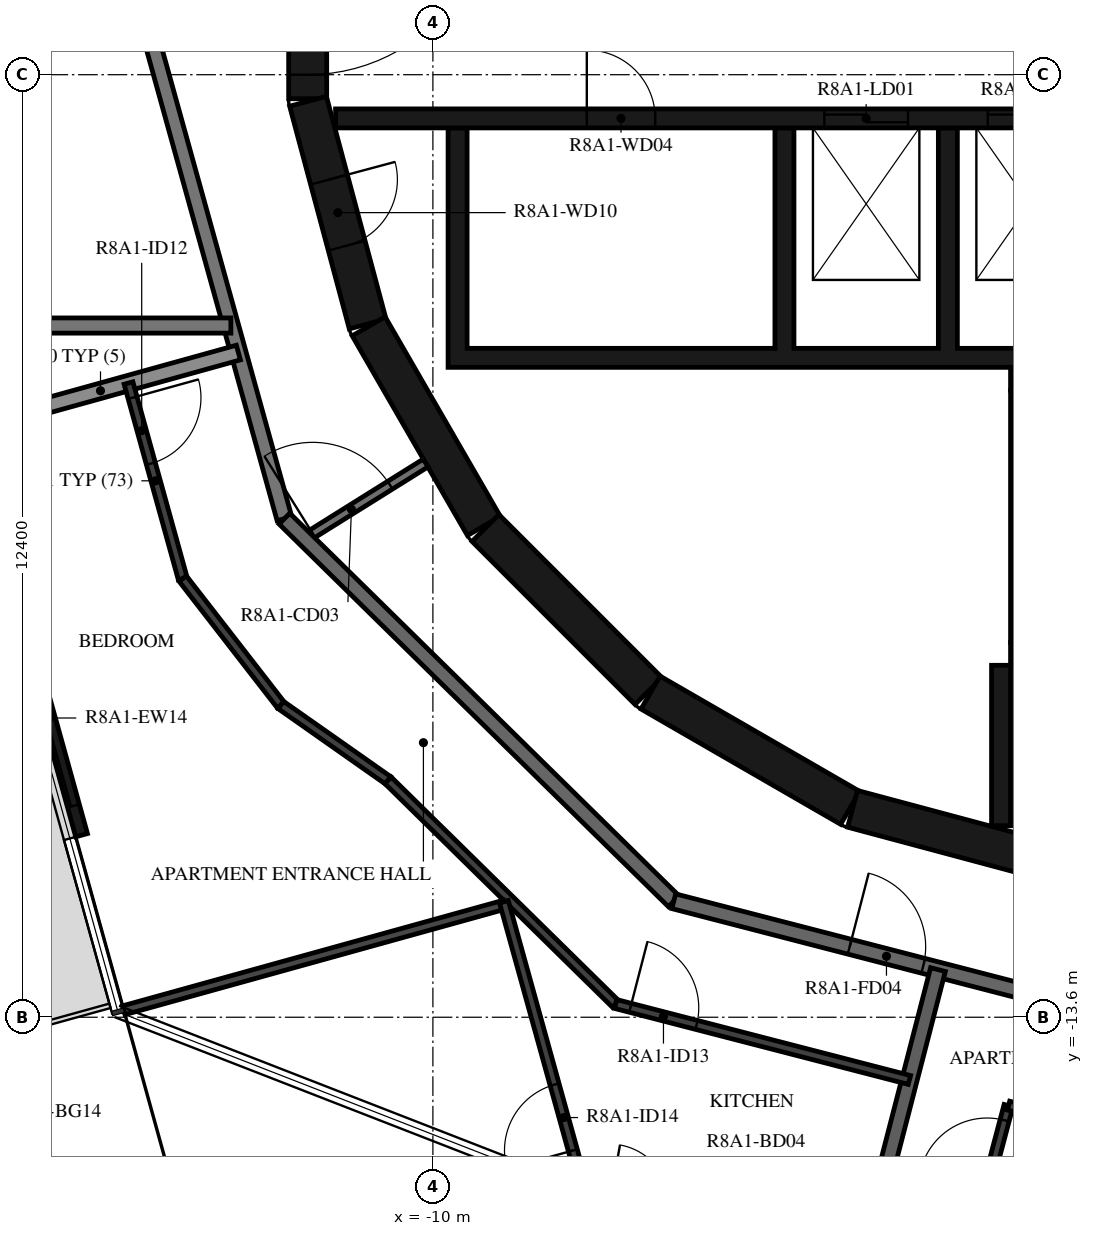
"""IFC4 building model, lengths in metres.
Left out: names, types, materials, properties, quantities, classifications, styles, units other than length and angle.
Written with IfcOpenShell. Run it as: python <this file> out.ifc"""

import sys

from ifc_helpers import new_model, si_unit, direction, frame, frame_2d, origin, place, context, subcontext, project, spatial, polyline, rectangle, outline, extrude, element, fill, save


model = new_model("IFC4")
c1 = context("Model", 3, precision=1e-05, world=origin(), true_north=direction((0.0, 1.0)))
c2 = subcontext(c1, "Body", "Model", "MODEL_VIEW")
j1 = project(units=[si_unit("LENGTHUNIT", "METRE"), si_unit("PLANEANGLEUNIT", "RADIAN")], contexts=[c1])
p1 = place(None, origin())
s1 = spatial("IfcSite", under=j1, at=p1, CompositionType="ELEMENT")
p2 = place(p1, origin())
s2 = spatial("IfcBuilding", under=s1, at=p2, CompositionType="ELEMENT")
p3 = place(p2, frame((0.0, 0.0, 301.7)))
s3 = spatial("IfcBuildingStorey", under=s2, at=p3, CompositionType="ELEMENT", Elevation=301.7)
p4 = place(p3, frame((-15.477, -8.122, 0.0), z_axis=(0.0, 0.0, 1.0), x_axis=(0.267195229387, -0.963642417805, 0.0)))
e1 = element("IfcWall", 1, at=p4, inside=s3, PredefinedType="STANDARD", context=c2, shape_type="SweptSolid", body=[
    extrude(rectangle(XDim=3.2, YDim=0.16, at=frame_2d((1.6, 0.0))), origin(), (0.0, 0.0, 1.0), 3.12),
])
p5 = place(p4, frame((0.4, 0.0, 0.0)))
e2 = element("IfcOpeningElement", 2, at=p5, cuts=e1, PredefinedType="OPENING", context=c2, shape_type="SweptSolid", body=[
    extrude(rectangle(XDim=2.4, YDim=2.4, at=frame_2d((1.2, 1.2))), frame((0.0, 0.09, 0.0), z_axis=(0.0, -1.0, 0.0), x_axis=(1.0, 0.0, 0.0)), (0.0, 0.0, 1.0), 0.18),
])
p6 = place(p3, frame((-11.647, 1.516, 0.0), z_axis=(0.0, 0.0, 1.0), x_axis=(0.0, -1.0, 0.0)))
e3 = element("IfcWall", 3, at=p6, inside=s3, PredefinedType="SHEAR", context=c2, shape_type="SweptSolid", body=[
    extrude(rectangle(XDim=3.033, YDim=0.5, at=frame_2d((1.516, 0.0))), origin(), (0.0, 0.0, 1.0), 3.12),
])
p7 = place(p6, frame((0.316, 0.0, 0.0)))
e4 = element("IfcOpeningElement", 4, at=p7, cuts=e3, PredefinedType="OPENING", context=c2, shape_type="SweptSolid", body=[
    extrude(rectangle(XDim=2.4, YDim=2.1, at=frame_2d((1.2, 1.05))), frame((0.0, 0.26, 0.0), z_axis=(0.0, -1.0, 0.0), x_axis=(1.0, 0.0, 0.0)), (0.0, 0.0, 1.0), 0.52),
])
p8 = place(p3, frame((-11.643, -1.55, 0.0), z_axis=(0.0, 0.0, 1.0), x_axis=(0.258734743916, -0.965948410781, 0.0)))
e5 = element("IfcWall", 5, at=p8, inside=s3, PredefinedType="SHEAR", context=c2, shape_type="SweptSolid", body=[
    extrude(rectangle(XDim=3.033, YDim=0.5, at=frame_2d((1.516, 0.0))), origin(), (0.0, 0.0, 1.0), 3.12),
])
p9 = place(p8, frame((1.066, 0.0, 0.0)))
e6 = element("IfcOpeningElement", 6, at=p9, cuts=e5, PredefinedType="OPENING", context=c2, shape_type="SweptSolid", body=[
    extrude(rectangle(XDim=0.9, YDim=2.1, at=frame_2d((0.45, 1.05))), frame((0.0, 0.26, 0.0), z_axis=(0.0, -1.0, 0.0), x_axis=(1.0, 0.0, 0.0)), (0.0, 0.0, 1.0), 0.52),
])
p10 = place(p3, frame((-10.845, -4.51, 0.0), z_axis=(0.0, 0.0, 1.0), x_axis=(0.500087131594, -0.865975092491, 0.0)))
e7 = element("IfcWall", 7, at=p10, inside=s3, PredefinedType="SHEAR", context=c2, shape_type="SweptSolid", body=[
    extrude(rectangle(XDim=3.033, YDim=0.5, at=frame_2d((1.516, 0.0))), origin(), (0.0, 0.0, 1.0), 3.12),
])
p11 = place(p3, frame((-9.308, -7.164, 0.0), z_axis=(0.0, 0.0, 1.0), x_axis=(0.707106781187, -0.707106781187, 0.0)))
e8 = element("IfcWall", 8, at=p11, inside=s3, PredefinedType="SHEAR", context=c2, shape_type="SweptSolid", body=[
    extrude(rectangle(XDim=3.032, YDim=0.5, at=frame_2d((1.516, 0.0))), origin(), (0.0, 0.0, 1.0), 3.12),
])
for number, where, z_axis, x_axis in (
    (9, (-7.137, -9.329, 0.0), (0.0, 0.0, 1.0), (0.866, -0.5, 0.0)),
    (10, (-4.479, -10.858, 0.0), (0.0, 0.0, 1.0), (0.966, -0.259, 0.0)),
):
    element("IfcWall", number, at=place(p3, frame(where, z_axis=z_axis, x_axis=x_axis)), inside=s3, PredefinedType="SHEAR", context=c2, shape_type="SweptSolid", body=[
        extrude(rectangle(XDim=3.033, YDim=0.5, at=frame_2d((1.516, 0.0))), origin(), (0.0, 0.0, 1.0), 3.12),
    ])
p12 = place(p3, frame((-2.275, -8.67, 0.0), z_axis=(0.0, 0.0, 1.0), x_axis=(0.0, 1.0, 0.0)))
e11 = element("IfcWall", 11, at=p12, inside=s3, PredefinedType="SHEAR", context=c2, shape_type="SweptSolid", body=[
    extrude(rectangle(XDim=3.32, YDim=0.25, at=frame_2d((1.66, 0.0))), origin(), (0.0, 0.0, 1.0), 3.12),
])
p13 = place(p3, frame((-2.4, -5.2, 0.0), z_axis=(0.0, 0.0, 1.0), x_axis=(1.0, 0.0, 0.0)))
e12 = element("IfcWall", 12, at=p13, inside=s3, PredefinedType="SHEAR", context=c2, shape_type="SweptSolid", body=[
    extrude(rectangle(XDim=7.05, YDim=0.3, at=frame_2d((3.525, 0.0))), origin(), (0.0, 0.0, 1.0), 3.12),
])
p14 = place(p3, frame((-2.4, -8.82, 0.0), z_axis=(0.0, 0.0, 1.0), x_axis=(1.0, 0.0, 0.0)))
e13 = element("IfcWall", 13, at=p14, inside=s3, PredefinedType="SHEAR", context=c2, shape_type="SweptSolid", body=[
    extrude(rectangle(XDim=2.5, YDim=0.3, at=frame_2d((1.25, 0.0))), origin(), (0.0, 0.0, 1.0), 3.12),
])
p15 = place(p14, frame((0.65, 0.0, 0.0)))
e14 = element("IfcOpeningElement", 14, at=p15, cuts=e13, PredefinedType="OPENING", context=c2, shape_type="SweptSolid", body=[
    extrude(rectangle(XDim=1.2, YDim=2.1, at=frame_2d((0.6, 1.05))), frame((0.0, 0.16, 0.0), z_axis=(0.0, -1.0, 0.0), x_axis=(1.0, 0.0, 0.0)), (0.0, 0.0, 1.0), 0.32),
])
p16 = place(p3, frame((-2.525, -8.97, 0.0), z_axis=(0.0, 0.0, 1.0), x_axis=(0.0, -1.0, 0.0)))
e15 = element("IfcWall", 15, at=p16, inside=s3, PredefinedType="SHEAR", context=c2, shape_type="SweptSolid", body=[
    extrude(rectangle(XDim=2.11, YDim=0.25, at=frame_2d((1.055, 0.0))), origin(), (0.0, 0.0, 1.0), 3.12),
])
p17 = place(p3, origin())
e16 = element("IfcWall", 16, at=p17, inside=s3, PredefinedType="SHEAR", context=c2, shape_type="SweptSolid", body=[
    extrude(outline(polyline([(9.8, -5.05), (9.8, -4.8), (9.8, -1.9), (9.55, -1.9), (9.55, -4.8), (7.65, -4.8), (7.65, -1.9), (7.4, -1.9), (7.4, -4.8), (5.5, -4.8), (5.5, -1.9), (5.25, -1.9), (5.25, -4.8), (3.35, -4.8), (3.35, -1.9), (3.1, -1.9), (3.1, -4.8), (1.2, -4.8), (1.2, -1.9), (0.95, -1.9), (0.95, -4.8), (-0.95, -4.8), (-0.95, -1.9), (-1.2, -1.9), (-1.2, -4.8), (-3.1, -4.8), (-3.1, -1.9), (-3.35, -1.9), (-3.35, -4.8), (-5.25, -4.8), (-5.25, -1.9), (-5.5, -1.9), (-5.5, -4.8), (-9.55, -4.8), (-9.55, -1.9), (-9.8, -1.9), (-9.8, -4.8), (-9.8, -5.05), (9.8, -5.05)])), origin(), (0.0, 0.0, 1.0), 3.12),
])
p18 = place(p3, frame((-11.28, -1.775, 0.0), z_axis=(0.0, 0.0, 1.0), x_axis=(1.0, 0.0, 0.0)))
e17 = element("IfcWall", 17, at=p18, inside=s3, PredefinedType="SHEAR", context=c2, shape_type="SweptSolid", body=[
    extrude(rectangle(XDim=14.38, YDim=0.25, at=frame_2d((7.19, 0.0))), origin(), (0.0, 0.0, 1.0), 3.12),
])
p19 = place(p18, frame((6.43, 0.0, 0.0)))
e18 = element("IfcOpeningElement", 18, at=p19, cuts=e17, PredefinedType="OPENING", context=c2, shape_type="SweptSolid", body=[
    extrude(rectangle(XDim=1.1, YDim=2.1, at=frame_2d((0.55, 1.05))), frame((0.0, 0.135, 0.0), z_axis=(0.0, -1.0, 0.0), x_axis=(1.0, 0.0, 0.0)), (0.0, 0.0, 1.0), 0.27),
])
p20 = place(p18, frame((8.58, 0.0, 0.0)))
e19 = element("IfcOpeningElement", 19, at=p20, cuts=e17, PredefinedType="OPENING", context=c2, shape_type="SweptSolid", body=[
    extrude(rectangle(XDim=1.1, YDim=2.1, at=frame_2d((0.55, 1.05))), frame((0.0, 0.135, 0.0), z_axis=(0.0, -1.0, 0.0), x_axis=(1.0, 0.0, 0.0)), (0.0, 0.0, 1.0), 0.27),
])
p21 = place(p18, frame((10.73, 0.0, 0.0)))
e20 = element("IfcOpeningElement", 20, at=p21, cuts=e17, PredefinedType="OPENING", context=c2, shape_type="SweptSolid", body=[
    extrude(rectangle(XDim=1.1, YDim=2.1, at=frame_2d((0.55, 1.05))), frame((0.0, 0.135, 0.0), z_axis=(0.0, -1.0, 0.0), x_axis=(1.0, 0.0, 0.0)), (0.0, 0.0, 1.0), 0.27),
])
p22 = place(p18, frame((3.305, 0.0, 0.0)))
e21 = element("IfcOpeningElement", 21, at=p22, cuts=e17, PredefinedType="OPENING", context=c2, shape_type="SweptSolid", body=[
    extrude(rectangle(XDim=0.9, YDim=2.1, at=frame_2d((0.45, 1.05))), frame((0.0, 0.135, 0.0), z_axis=(0.0, -1.0, 0.0), x_axis=(1.0, 0.0, 0.0)), (0.0, 0.0, 1.0), 0.27),
])
p23 = place(p18, frame((12.98, 0.0, 0.0)))
e22 = element("IfcOpeningElement", 22, at=p23, cuts=e17, PredefinedType="OPENING", context=c2, shape_type="SweptSolid", body=[
    extrude(rectangle(XDim=0.9, YDim=2.1, at=frame_2d((0.45, 1.05))), frame((0.0, 0.135, 0.0), z_axis=(0.0, -1.0, 0.0), x_axis=(1.0, 0.0, 0.0)), (0.0, 0.0, 1.0), 0.27),
])
p24 = place(p3, frame((-11.687, -7.303, 0.0), z_axis=(0.0, 0.0, 1.0), x_axis=(0.848064094072, 0.529893661357, 0.0)))
e23 = element("IfcWall", 23, at=p24, inside=s3, PredefinedType="PARTITIONING", context=c2, shape_type="SweptSolid", body=[
    extrude(rectangle(XDim=1.876, YDim=0.12, at=frame_2d((0.938, 0.0))), origin(), (0.0, 0.0, 1.0), 3.12),
])
p25 = place(p24, frame((0.125, 0.0, 0.0)))
e24 = element("IfcOpeningElement", 24, at=p25, cuts=e23, PredefinedType="OPENING", context=c2, shape_type="SweptSolid", body=[
    extrude(rectangle(XDim=1.2, YDim=2.1, at=frame_2d((0.6, 1.05))), frame((0.0, 0.07, 0.0), z_axis=(0.0, -1.0, 0.0), x_axis=(1.0, 0.0, 0.0)), (0.0, 0.0, 1.0), 0.14),
])
p26 = place(p3, frame((-13.872, -0.121, 0.0), z_axis=(0.0, 0.0, 1.0), x_axis=(0.267254575108, -0.963625960674, 0.0)))
e25 = element("IfcWall", 25, at=p26, inside=s3, PredefinedType="STANDARD", context=c2, shape_type="SweptSolid", body=[
    extrude(rectangle(XDim=7.181, YDim=0.2, at=frame_2d((3.591, 0.0))), origin(), (0.0, 0.0, 1.0), 3.12),
])
p27 = place(p3, frame((-11.953, -7.041, 0.0), z_axis=(0.0, 0.0, 1.0), x_axis=(0.713250549143, -0.70090916255, 0.0)))
e26 = element("IfcWall", 26, at=p27, inside=s3, PredefinedType="STANDARD", context=c2, shape_type="SweptSolid", body=[
    extrude(rectangle(XDim=7.181, YDim=0.2, at=frame_2d((3.59, 0.0))), origin(), (0.0, 0.0, 1.0), 3.12),
])
p28 = place(p3, frame((-6.831, -12.074, 0.0), z_axis=(0.0, 0.0, 1.0), x_axis=(0.968144780225, -0.250391063186, 0.0)))
e27 = element("IfcWall", 27, at=p28, inside=s3, PredefinedType="STANDARD", context=c2, shape_type="SweptSolid", body=[
    extrude(rectangle(XDim=7.181, YDim=0.2, at=frame_2d((3.591, 0.0))), origin(), (0.0, 0.0, 1.0), 3.12),
])
p29 = place(p28, frame((2.39, 0.0, 0.0)))
e28 = element("IfcOpeningElement", 28, at=p29, cuts=e27, PredefinedType="OPENING", context=c2, shape_type="SweptSolid", body=[
    extrude(rectangle(XDim=1.0, YDim=2.1, at=frame_2d((0.5, 1.05))), frame((0.0, 0.11, 0.0), z_axis=(0.0, -1.0, 0.0), x_axis=(1.0, 0.0, 0.0)), (0.0, 0.0, 1.0), 0.22),
])
p30 = place(p28, frame((5.69, 0.0, 0.0)))
e29 = element("IfcOpeningElement", 29, at=p30, cuts=e27, PredefinedType="OPENING", context=c2, shape_type="SweptSolid", body=[
    extrude(rectangle(XDim=1.0, YDim=2.1, at=frame_2d((0.5, 1.05))), frame((0.0, 0.11, 0.0), z_axis=(0.0, -1.0, 0.0), x_axis=(1.0, 0.0, 0.0)), (0.0, 0.0, 1.0), 0.22),
])
p31 = place(p3, frame((-16.564, -4.5, 0.0), z_axis=(0.0, 0.0, 1.0), x_axis=(1.0, 0.0, 0.0)))
e30 = element("IfcWall", 30, at=p31, inside=s3, PredefinedType="STANDARD", context=c2, shape_type="SweptSolid", body=[
    extrude(rectangle(XDim=3.907, YDim=0.2, at=frame_2d((1.953, 0.0))), origin(), (0.0, 0.0, 1.0), 3.12),
])
p32 = place(p3, frame((-16.187, -5.862, 0.0), z_axis=(0.0, 0.0, 1.0), x_axis=(0.963631166683, 0.267235803358, 0.0)))
e31 = element("IfcWall", 31, at=p32, inside=s3, PredefinedType="STANDARD", context=c2, shape_type="SweptSolid", body=[
    extrude(rectangle(XDim=3.765, YDim=0.2, at=frame_2d((1.882, 0.0))), origin(), (0.0, 0.0, 1.0), 2.73),
])
p33 = place(p3, frame((-4.214, -16.295, 0.0), z_axis=(0.0, 0.0, 1.0), x_axis=(0.250428810918, 0.968135016752, 0.0)))
e32 = element("IfcWall", 32, at=p33, inside=s3, PredefinedType="STANDARD", context=c2, shape_type="SweptSolid", body=[
    extrude(rectangle(XDim=3.432, YDim=0.2, at=frame_2d((1.716, 0.0))), origin(), (0.0, 0.0, 1.0), 3.12),
])
p34 = place(p3, frame((-14.005, -5.256, 0.0), z_axis=(0.0, 0.0, 1.0), x_axis=(0.267200500487, -0.963640956238, 0.0)))
e33 = element("IfcWall", 33, at=p34, inside=s3, PredefinedType="PARTITIONING", context=c2, shape_type="SweptSolid", body=[
    extrude(rectangle(XDim=2.67, YDim=0.12, at=frame_2d((1.335, 0.0))), origin(), (0.0, 0.0, 1.0), 3.12),
])
p35 = place(p34, frame((0.2, 0.0, 0.0)))
e34 = element("IfcOpeningElement", 34, at=p35, cuts=e33, PredefinedType="OPENING", context=c2, shape_type="SweptSolid", body=[
    extrude(rectangle(XDim=0.9, YDim=2.1, at=frame_2d((0.45, 1.05))), frame((0.0, 0.07, 0.0), z_axis=(0.0, -1.0, 0.0), x_axis=(1.0, 0.0, 0.0)), (0.0, 0.0, 1.0), 0.14),
])
p36 = place(p3, frame((-13.291, -7.829, 0.0), z_axis=(0.0, 0.0, 1.0), x_axis=(0.613017069232, -0.790069663277, 0.0)))
e35 = element("IfcWall", 35, at=p36, inside=s3, PredefinedType="PARTITIONING", context=c2, shape_type="SweptSolid", body=[
    extrude(rectangle(XDim=2.106, YDim=0.12, at=frame_2d((1.053, 0.0))), origin(), (0.0, 0.0, 1.0), 3.12),
])
p37 = place(p3, frame((-12.0, -9.493, 0.0), z_axis=(0.0, 0.0, 1.0), x_axis=(0.818312362022, -0.57477376259, 0.0)))
e36 = element("IfcWall", 36, at=p37, inside=s3, PredefinedType="PARTITIONING", context=c2, shape_type="SweptSolid", body=[
    extrude(rectangle(XDim=1.723, YDim=0.12, at=frame_2d((0.862, 0.0))), origin(), (0.0, 0.0, 1.0), 3.12),
])
p38 = place(p3, frame((-10.59, -10.483, 0.0), z_axis=(0.0, 0.0, 1.0), x_axis=(0.713244109461, -0.70091571556, 0.0)))
e37 = element("IfcWall", 37, at=p38, inside=s3, PredefinedType="PARTITIONING", context=c2, shape_type="SweptSolid", body=[
    extrude(rectangle(XDim=4.198, YDim=0.12, at=frame_2d((2.099, 0.0))), origin(), (0.0, 0.0, 1.0), 3.12),
])
p39 = place(p3, frame((-7.596, -13.426, 0.0), z_axis=(0.0, 0.0, 1.0), x_axis=(0.96815406745, -0.250355151095, 0.0)))
e38 = element("IfcWall", 38, at=p39, inside=s3, PredefinedType="PARTITIONING", context=c2, shape_type="SweptSolid", body=[
    extrude(rectangle(XDim=3.992, YDim=0.12, at=frame_2d((1.996, 0.0))), origin(), (0.0, 0.0, 1.0), 3.12),
])
p40 = place(p39, frame((0.2, 0.0, 0.0)))
e39 = element("IfcOpeningElement", 39, at=p40, cuts=e38, PredefinedType="OPENING", context=c2, shape_type="SweptSolid", body=[
    extrude(rectangle(XDim=0.9, YDim=2.1, at=frame_2d((0.45, 1.05))), frame((0.0, 0.07, 0.0), z_axis=(0.0, -1.0, 0.0), x_axis=(1.0, 0.0, 0.0)), (0.0, 0.0, 1.0), 0.14),
])
p41 = place(p3, frame((-14.066, -13.508, 0.0), z_axis=(0.0, 0.0, 1.0), x_axis=(0.963643585504, 0.267191018032, 0.0)))
e40 = element("IfcWall", 40, at=p41, inside=s3, PredefinedType="PARTITIONING", context=c2, shape_type="SweptSolid", body=[
    extrude(rectangle(XDim=5.2, YDim=0.12, at=frame_2d((2.6, 0.0))), origin(), (0.0, 0.0, 1.0), 2.73),
])
p42 = place(p3, frame((-7.368, -18.202, 0.0), z_axis=(0.0, 0.0, 1.0), x_axis=(-0.26723158658, 0.963632336077, 0.0)))
e41 = element("IfcWall", 41, at=p42, inside=s3, PredefinedType="PARTITIONING", context=c2, shape_type="SweptSolid", body=[
    extrude(rectangle(XDim=6.353, YDim=0.12, at=frame_2d((3.177, 0.0))), origin(), (0.0, 0.0, 1.0), 3.12),
])
p43 = place(p42, frame((2.956, 0.0, 0.0)))
e42 = element("IfcOpeningElement", 42, at=p43, cuts=e41, PredefinedType="OPENING", context=c2, shape_type="SweptSolid", body=[
    extrude(rectangle(XDim=0.9, YDim=2.1, at=frame_2d((0.45, 1.05))), frame((0.0, 0.07, 0.0), z_axis=(0.0, -1.0, 0.0), x_axis=(1.0, 0.0, 0.0)), (0.0, 0.0, 1.0), 0.14),
])
p44 = place(p3, frame((-3.139, -17.448, 0.0), z_axis=(0.0, 0.0, 1.0), x_axis=(0.256551998295, 0.966530430028, 0.0)))
e43 = element("IfcWall", 43, at=p44, inside=s3, PredefinedType="PARTITIONING", context=c2, shape_type="SweptSolid", body=[
    extrude(rectangle(XDim=2.778, YDim=0.12, at=frame_2d((1.389, 0.0))), origin(), (0.0, 0.0, 1.0), 3.12),
])
p45 = place(p44, frame((1.678, 0.0, 0.0)))
e44 = element("IfcOpeningElement", 44, at=p45, cuts=e43, PredefinedType="OPENING", context=c2, shape_type="SweptSolid", body=[
    extrude(rectangle(XDim=0.9, YDim=2.1, at=frame_2d((0.45, 1.05))), frame((0.0, 0.07, 0.0), z_axis=(0.0, -1.0, 0.0), x_axis=(1.0, 0.0, 0.0)), (0.0, 0.0, 1.0), 0.14),
])
p46 = place(p3, frame((-2.427, -14.763, 0.0), z_axis=(0.0, 0.0, 1.0), x_axis=(0.968151154118, -0.250366417036, 0.0)))
e45 = element("IfcWall", 45, at=p46, inside=s3, PredefinedType="PARTITIONING", context=c2, shape_type="SweptSolid", body=[
    extrude(rectangle(XDim=2.646, YDim=0.12, at=frame_2d((1.323, 0.0))), origin(), (0.0, 0.0, 1.0), 3.12),
])
p47 = place(p5, origin())
e46 = element("IfcDoor", 46, at=p47, inside=s3, OperationType="DOUBLE_DOOR_SLIDING", PredefinedType="DOOR", context=c2, shape_type="SweptSolid", body=[
    extrude(rectangle(XDim=2.4, YDim=2.4, at=frame_2d((1.2, 1.2))), frame((0.0, 0.025, 0.0), z_axis=(0.0, -1.0, 0.0), x_axis=(1.0, 0.0, 0.0)), (0.0, 0.0, 1.0), 0.05),
])
fill(e2, e46)
p48 = place(p7, origin())
e47 = element("IfcDoor", 47, at=p48, inside=s3, OperationType="DOUBLE_DOOR_SINGLE_SWING", PredefinedType="DOOR", context=c2, shape_type="SweptSolid", body=[
    extrude(rectangle(XDim=2.4, YDim=2.1, at=frame_2d((1.2, 1.05))), frame((0.0, 0.025, 0.0), z_axis=(0.0, -1.0, 0.0), x_axis=(1.0, 0.0, 0.0)), (0.0, 0.0, 1.0), 0.05),
])
fill(e4, e47)
p49 = place(p19, origin())
e48 = element("IfcDoor", 48, at=p49, inside=s3, OperationType="DOUBLE_DOOR_SLIDING", PredefinedType="DOOR", context=c2, shape_type="SweptSolid", body=[
    extrude(rectangle(XDim=1.1, YDim=2.1, at=frame_2d((0.55, 1.05))), frame((0.0, 0.025, 0.0), z_axis=(0.0, -1.0, 0.0), x_axis=(1.0, 0.0, 0.0)), (0.0, 0.0, 1.0), 0.05),
])
fill(e18, e48)
p50 = place(p20, origin())
e49 = element("IfcDoor", 49, at=p50, inside=s3, OperationType="DOUBLE_DOOR_SLIDING", PredefinedType="DOOR", context=c2, shape_type="SweptSolid", body=[
    extrude(rectangle(XDim=1.1, YDim=2.1, at=frame_2d((0.55, 1.05))), frame((0.0, 0.025, 0.0), z_axis=(0.0, -1.0, 0.0), x_axis=(1.0, 0.0, 0.0)), (0.0, 0.0, 1.0), 0.05),
])
fill(e19, e49)
p51 = place(p22, origin())
e50 = element("IfcDoor", 50, at=p51, inside=s3, OperationType="SINGLE_SWING_RIGHT", PredefinedType="DOOR", context=c2, shape_type="SweptSolid", body=[
    extrude(rectangle(XDim=0.9, YDim=2.1, at=frame_2d((0.45, 1.05))), frame((0.0, 0.025, 0.0), z_axis=(0.0, -1.0, 0.0), x_axis=(1.0, 0.0, 0.0)), (0.0, 0.0, 1.0), 0.05),
])
fill(e21, e50)
p52 = place(p9, origin())
e51 = element("IfcDoor", 51, at=p52, inside=s3, OperationType="SINGLE_SWING_RIGHT", PredefinedType="DOOR", context=c2, shape_type="SweptSolid", body=[
    extrude(rectangle(XDim=0.9, YDim=2.1, at=frame_2d((0.45, 1.05))), frame((0.0, 0.025, 0.0), z_axis=(0.0, -1.0, 0.0), x_axis=(1.0, 0.0, 0.0)), (0.0, 0.0, 1.0), 0.05),
])
fill(e6, e51)
p53 = place(p29, origin())
e52 = element("IfcDoor", 52, at=p53, inside=s3, OperationType="SINGLE_SWING_RIGHT", PredefinedType="DOOR", context=c2, shape_type="SweptSolid", body=[
    extrude(rectangle(XDim=1.0, YDim=2.1, at=frame_2d((0.5, 1.05))), frame((0.0, 0.025, 0.0), z_axis=(0.0, -1.0, 0.0), x_axis=(1.0, 0.0, 0.0)), (0.0, 0.0, 1.0), 0.05),
])
fill(e28, e52)
p54 = place(p35, origin())
e53 = element("IfcDoor", 53, at=p54, inside=s3, OperationType="SINGLE_SWING_RIGHT", PredefinedType="DOOR", context=c2, shape_type="SweptSolid", body=[
    extrude(rectangle(XDim=0.9, YDim=2.1, at=frame_2d((0.45, 1.05))), frame((0.0, 0.025, 0.0), z_axis=(0.0, -1.0, 0.0), x_axis=(1.0, 0.0, 0.0)), (0.0, 0.0, 1.0), 0.05),
])
fill(e34, e53)
p55 = place(p40, origin())
e54 = element("IfcDoor", 54, at=p55, inside=s3, OperationType="SINGLE_SWING_RIGHT", PredefinedType="DOOR", context=c2, shape_type="SweptSolid", body=[
    extrude(rectangle(XDim=0.9, YDim=2.1, at=frame_2d((0.45, 1.05))), frame((0.0, 0.025, 0.0), z_axis=(0.0, -1.0, 0.0), x_axis=(1.0, 0.0, 0.0)), (0.0, 0.0, 1.0), 0.05),
])
fill(e39, e54)
p56 = place(p43, origin())
e55 = element("IfcDoor", 55, at=p56, inside=s3, OperationType="SINGLE_SWING_RIGHT", PredefinedType="DOOR", context=c2, shape_type="SweptSolid", body=[
    extrude(rectangle(XDim=0.9, YDim=2.1, at=frame_2d((0.45, 1.05))), frame((0.0, 0.025, 0.0), z_axis=(0.0, -1.0, 0.0), x_axis=(1.0, 0.0, 0.0)), (0.0, 0.0, 1.0), 0.05),
])
fill(e42, e55)
p57 = place(p45, origin())
e56 = element("IfcDoor", 56, at=p57, inside=s3, OperationType="SINGLE_SWING_LEFT", PredefinedType="DOOR", context=c2, shape_type="SweptSolid", body=[
    extrude(rectangle(XDim=0.9, YDim=2.1, at=frame_2d((0.45, 1.05))), frame((0.0, 0.025, 0.0), z_axis=(0.0, -1.0, 0.0), x_axis=(1.0, 0.0, 0.0)), (0.0, 0.0, 1.0), 0.05),
])
fill(e44, e56)
p58 = place(p25, origin())
e57 = element("IfcDoor", 57, at=p58, inside=s3, OperationType="DOUBLE_DOOR_SINGLE_SWING", PredefinedType="DOOR", context=c2, shape_type="SweptSolid", body=[
    extrude(rectangle(XDim=1.2, YDim=2.1, at=frame_2d((0.6, 1.05))), frame((0.0, 0.025, 0.0), z_axis=(0.0, -1.0, 0.0), x_axis=(1.0, 0.0, 0.0)), (0.0, 0.0, 1.0), 0.05),
])
fill(e24, e57)
save(model, sys.argv[1])
